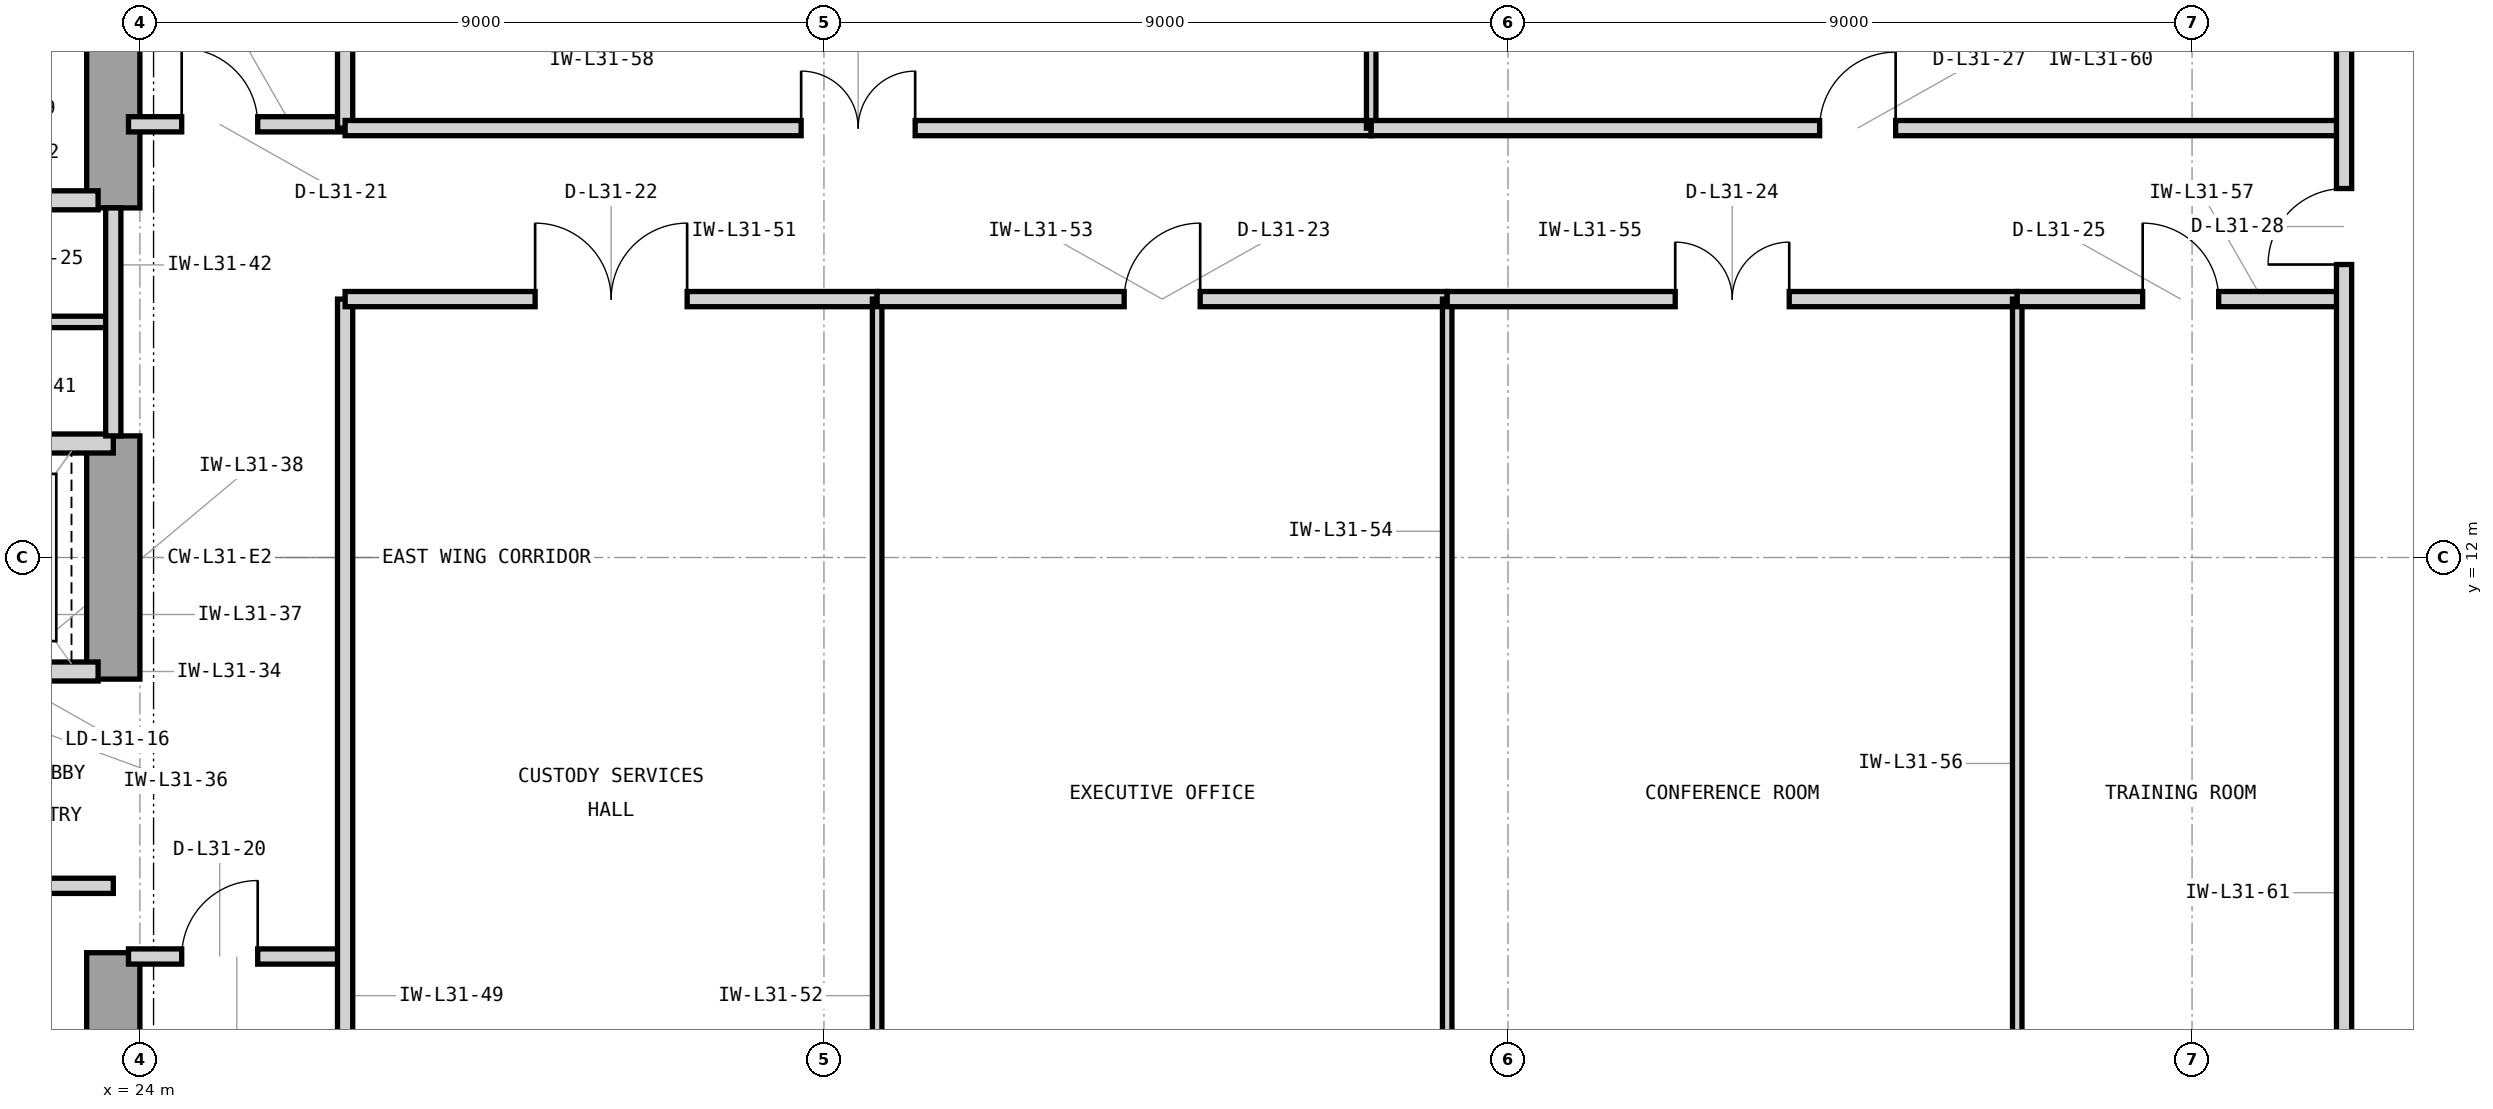
"""IFC4 building model, lengths in metres.
Left out: names, types, materials, properties, quantities, classifications, styles, units other than length and angle.
Written with IfcOpenShell. Run it as: python <this file> out.ifc"""

import sys

from ifc_helpers import new_model, si_unit, direction, frame, frame_2d, origin, place, context, subcontext, project, spatial, rectangle, extrude, element, fill, save


model = new_model("IFC4")
c1 = context("Model", 3, precision=1e-05, world=origin(), true_north=direction((0.0, 1.0)))
c2 = subcontext(c1, "Body", "Model", "MODEL_VIEW")
j1 = project(units=[si_unit("LENGTHUNIT", "METRE"), si_unit("PLANEANGLEUNIT", "RADIAN")], contexts=[c1])
p1 = place(None, origin())
s1 = spatial("IfcSite", under=j1, at=p1, CompositionType="ELEMENT")
p2 = place(p1, origin())
s2 = spatial("IfcBuilding", under=s1, at=p2, CompositionType="ELEMENT")
p3 = place(p2, frame((0.0, 0.0, 132.3)))
s3 = spatial("IfcBuildingStorey", under=s2, at=p3, CompositionType="ELEMENT", Elevation=132.3)
p4 = place(p3, frame((23.65, 3.7, 0.0), z_axis=(0.0, 0.0, 1.0), x_axis=(0.0, 1.0, 0.0)))
e1 = element("IfcWall", 1, at=p4, inside=s3, PredefinedType="SHEAR", context=c2, shape_type="SweptSolid", body=[
    extrude(rectangle(XDim=3.1, YDim=0.7, at=frame_2d((1.55, 0.0))), origin(), (0.0, 0.0, 1.0), 3.9),
])
p5 = place(p3, frame((23.65, 10.4, 0.0), z_axis=(0.0, 0.0, 1.0), x_axis=(0.0, 1.0, 0.0)))
e2 = element("IfcWall", 2, at=p5, inside=s3, PredefinedType="SHEAR", context=c2, shape_type="SweptSolid", body=[
    extrude(rectangle(XDim=3.2, YDim=0.7, at=frame_2d((1.6, 0.0))), origin(), (0.0, 0.0, 1.0), 3.9),
])
p6 = place(p3, frame((23.65, 16.6, 0.0), z_axis=(0.0, 0.0, 1.0), x_axis=(0.0, 1.0, 0.0)))
e3 = element("IfcWall", 3, at=p6, inside=s3, PredefinedType="SHEAR", context=c2, shape_type="SweptSolid", body=[
    extrude(rectangle(XDim=4.05, YDim=0.7, at=frame_2d((2.025, 0.0))), origin(), (0.0, 0.0, 1.0), 3.9),
])
p7 = place(p3, frame((21.05, 16.7, 0.0), z_axis=(0.0, 0.0, 1.0), x_axis=(1.0, 0.0, 0.0)))
e4 = element("IfcWall", 4, at=p7, inside=s3, PredefinedType="PARTITIONING", context=c2, shape_type="SweptSolid", body=[
    extrude(rectangle(XDim=2.4, YDim=0.25, at=frame_2d((1.2, 0.0))), origin(), (0.0, 0.0, 1.0), 3.233),
])
p8 = place(p3, frame((20.55, 7.68, 0.0), z_axis=(0.0, 0.0, 1.0), x_axis=(1.0, 0.0, 0.0)))
e5 = element("IfcWall", 5, at=p8, inside=s3, PredefinedType="PARTITIONING", context=c2, shape_type="SweptSolid", body=[
    extrude(rectangle(XDim=3.1, YDim=0.2, at=frame_2d((1.55, 0.0))), origin(), (0.0, 0.0, 1.0), 3.69),
])
p9 = place(p8, frame((1.075, 0.0, 0.0)))
e6 = element("IfcOpeningElement", 6, at=p9, cuts=e5, PredefinedType="OPENING", context=c2, shape_type="SweptSolid", body=[
    extrude(rectangle(XDim=0.95, YDim=2.1, at=frame_2d((0.475, 1.05))), frame((0.0, 0.11, 0.0), z_axis=(0.0, -1.0, 0.0), x_axis=(1.0, 0.0, 0.0)), (0.0, 0.0, 1.0), 0.22),
])
p10 = place(p3, frame((21.05, 10.5, 0.0), z_axis=(0.0, 0.0, 1.0), x_axis=(1.0, 0.0, 0.0)))
e7 = element("IfcWall", 7, at=p10, inside=s3, PredefinedType="PARTITIONING", context=c2, shape_type="SweptSolid", body=[
    extrude(rectangle(XDim=2.4, YDim=0.25, at=frame_2d((1.2, 0.0))), origin(), (0.0, 0.0, 1.0), 3.233),
])
p11 = place(p10, frame((0.48, 0.0, 0.0)))
e8 = element("IfcOpeningElement", 8, at=p11, cuts=e7, PredefinedType="OPENING", context=c2, shape_type="SweptSolid", body=[
    extrude(rectangle(XDim=1.15, YDim=2.25, at=frame_2d((0.575, 1.125))), frame((0.0, 0.135, 0.0), z_axis=(0.0, -1.0, 0.0), x_axis=(1.0, 0.0, 0.0)), (0.0, 0.0, 1.0), 0.27),
])
p12 = place(p3, frame((14.7, 13.5, 0.0), z_axis=(0.0, 0.0, 1.0), x_axis=(1.0, 0.0, 0.0)))
e9 = element("IfcWall", 9, at=p12, inside=s3, PredefinedType="PARTITIONING", context=c2, shape_type="SweptSolid", body=[
    extrude(rectangle(XDim=8.95, YDim=0.25, at=frame_2d((4.475, 0.0))), origin(), (0.0, 0.0, 1.0), 3.233),
])
p13 = place(p3, frame((16.6, 15.1, 0.0), z_axis=(0.0, 0.0, 1.0), x_axis=(1.0, 0.0, 0.0)))
e10 = element("IfcWall", 10, at=p13, inside=s3, PredefinedType="PARTITIONING", context=c2, shape_type="SweptSolid", body=[
    extrude(rectangle(XDim=7.05, YDim=0.15, at=frame_2d((3.525, 0.0))), origin(), (0.0, 0.0, 1.0), 3.69),
])
p14 = place(p3, frame((23.65, 13.6, 0.0), z_axis=(0.0, 0.0, 1.0), x_axis=(0.0, 1.0, 0.0)))
e11 = element("IfcWall", 11, at=p14, inside=s3, PredefinedType="PARTITIONING", context=c2, shape_type="SweptSolid", body=[
    extrude(rectangle(XDim=3.0, YDim=0.2, at=frame_2d((1.5, 0.0))), origin(), (0.0, 0.0, 1.0), 3.69),
])
p15 = place(p3, frame((23.85, 6.75, 0.0), z_axis=(0.0, 0.0, 1.0), x_axis=(1.0, 0.0, 0.0)))
e12 = element("IfcWall", 12, at=p15, inside=s3, PredefinedType="PARTITIONING", context=c2, shape_type="SweptSolid", body=[
    extrude(rectangle(XDim=2.85, YDim=0.2, at=frame_2d((1.425, 0.0))), origin(), (0.0, 0.0, 1.0), 3.69),
])
p16 = place(p15, frame((0.7, 0.0, 0.0)))
e13 = element("IfcOpeningElement", 13, at=p16, cuts=e12, PredefinedType="OPENING", context=c2, shape_type="SweptSolid", body=[
    extrude(rectangle(XDim=1.0, YDim=2.15, at=frame_2d((0.5, 1.075))), frame((0.0, 0.11, 0.0), z_axis=(0.0, -1.0, 0.0), x_axis=(1.0, 0.0, 0.0)), (0.0, 0.0, 1.0), 0.22),
])
p17 = place(p3, frame((23.85, 17.7, 0.0), z_axis=(0.0, 0.0, 1.0), x_axis=(1.0, 0.0, 0.0)))
e14 = element("IfcWall", 14, at=p17, inside=s3, PredefinedType="PARTITIONING", context=c2, shape_type="SweptSolid", body=[
    extrude(rectangle(XDim=2.85, YDim=0.2, at=frame_2d((1.425, 0.0))), origin(), (0.0, 0.0, 1.0), 3.69),
])
p18 = place(p17, frame((0.7, 0.0, 0.0)))
e15 = element("IfcOpeningElement", 15, at=p18, cuts=e14, PredefinedType="OPENING", context=c2, shape_type="SweptSolid", body=[
    extrude(rectangle(XDim=1.0, YDim=2.15, at=frame_2d((0.5, 1.075))), frame((0.0, 0.11, 0.0), z_axis=(0.0, -1.0, 0.0), x_axis=(1.0, 0.0, 0.0)), (0.0, 0.0, 1.0), 0.22),
])
p19 = place(p3, frame((26.7, 3.18, 0.0), z_axis=(0.0, 0.0, 1.0), x_axis=(0.0, 1.0, 0.0)))
e16 = element("IfcWall", 16, at=p19, inside=s3, PredefinedType="PARTITIONING", context=c2, shape_type="SweptSolid", body=[
    extrude(rectangle(XDim=12.22, YDim=0.2, at=frame_2d((6.11, 0.0))), origin(), (0.0, 0.0, 1.0), 3.69),
])
p20 = place(p3, frame((26.7, 17.65, 0.0), z_axis=(0.0, 0.0, 1.0), x_axis=(0.0, 1.0, 0.0)))
e17 = element("IfcWall", 17, at=p20, inside=s3, PredefinedType="PARTITIONING", context=c2, shape_type="SweptSolid", body=[
    extrude(rectangle(XDim=3.17, YDim=0.2, at=frame_2d((1.585, 0.0))), origin(), (0.0, 0.0, 1.0), 3.69),
])
p21 = place(p3, frame((26.7, 15.4, 0.0), z_axis=(0.0, 0.0, 1.0), x_axis=(1.0, 0.0, 0.0)))
e18 = element("IfcWall", 18, at=p21, inside=s3, PredefinedType="PARTITIONING", context=c2, shape_type="SweptSolid", body=[
    extrude(rectangle(XDim=7.0, YDim=0.2, at=frame_2d((3.5, 0.0))), origin(), (0.0, 0.0, 1.0), 3.69),
])
p22 = place(p21, frame((2.5, 0.0, 0.0)))
e19 = element("IfcOpeningElement", 19, at=p22, cuts=e18, PredefinedType="OPENING", context=c2, shape_type="SweptSolid", body=[
    extrude(rectangle(XDim=2.0, YDim=2.5, at=frame_2d((1.0, 1.25))), frame((0.0, 0.11, 0.0), z_axis=(0.0, -1.0, 0.0), x_axis=(1.0, 0.0, 0.0)), (0.0, 0.0, 1.0), 0.22),
])
p23 = place(p3, frame((33.7, 3.18, 0.0), z_axis=(0.0, 0.0, 1.0), x_axis=(0.0, 1.0, 0.0)))
e20 = element("IfcWall", 20, at=p23, inside=s3, PredefinedType="PARTITIONING", context=c2, shape_type="SweptSolid", body=[
    extrude(rectangle(XDim=12.22, YDim=0.125, at=frame_2d((6.11, 0.0))), origin(), (0.0, 0.0, 1.0), 3.69),
])
p24 = place(p3, frame((33.7, 15.4, 0.0), z_axis=(0.0, 0.0, 1.0), x_axis=(1.0, 0.0, 0.0)))
e21 = element("IfcWall", 21, at=p24, inside=s3, PredefinedType="PARTITIONING", context=c2, shape_type="SweptSolid", body=[
    extrude(rectangle(XDim=7.5, YDim=0.2, at=frame_2d((3.75, 0.0))), origin(), (0.0, 0.0, 1.0), 3.69),
])
p25 = place(p24, frame((3.25, 0.0, 0.0)))
e22 = element("IfcOpeningElement", 22, at=p25, cuts=e21, PredefinedType="OPENING", context=c2, shape_type="SweptSolid", body=[
    extrude(rectangle(XDim=1.0, YDim=2.15, at=frame_2d((0.5, 1.075))), frame((0.0, 0.11, 0.0), z_axis=(0.0, -1.0, 0.0), x_axis=(1.0, 0.0, 0.0)), (0.0, 0.0, 1.0), 0.22),
])
p26 = place(p3, frame((41.2, 3.18, 0.0), z_axis=(0.0, 0.0, 1.0), x_axis=(0.0, 1.0, 0.0)))
e23 = element("IfcWall", 23, at=p26, inside=s3, PredefinedType="PARTITIONING", context=c2, shape_type="SweptSolid", body=[
    extrude(rectangle(XDim=12.22, YDim=0.125, at=frame_2d((6.11, 0.0))), origin(), (0.0, 0.0, 1.0), 3.69),
])
p27 = place(p3, frame((41.2, 15.4, 0.0), z_axis=(0.0, 0.0, 1.0), x_axis=(1.0, 0.0, 0.0)))
e24 = element("IfcWall", 24, at=p27, inside=s3, PredefinedType="PARTITIONING", context=c2, shape_type="SweptSolid", body=[
    extrude(rectangle(XDim=7.5, YDim=0.2, at=frame_2d((3.75, 0.0))), origin(), (0.0, 0.0, 1.0), 3.69),
])
p28 = place(p27, frame((3.0, 0.0, 0.0)))
e25 = element("IfcOpeningElement", 25, at=p28, cuts=e24, PredefinedType="OPENING", context=c2, shape_type="SweptSolid", body=[
    extrude(rectangle(XDim=1.5, YDim=2.3, at=frame_2d((0.75, 1.15))), frame((0.0, 0.11, 0.0), z_axis=(0.0, -1.0, 0.0), x_axis=(1.0, 0.0, 0.0)), (0.0, 0.0, 1.0), 0.22),
])
p29 = place(p3, frame((48.7, 3.18, 0.0), z_axis=(0.0, 0.0, 1.0), x_axis=(0.0, 1.0, 0.0)))
e26 = element("IfcWall", 26, at=p29, inside=s3, PredefinedType="PARTITIONING", context=c2, shape_type="SweptSolid", body=[
    extrude(rectangle(XDim=12.22, YDim=0.125, at=frame_2d((6.11, 0.0))), origin(), (0.0, 0.0, 1.0), 3.69),
])
p30 = place(p3, frame((48.7, 15.4, 0.0), z_axis=(0.0, 0.0, 1.0), x_axis=(1.0, 0.0, 0.0)))
e27 = element("IfcWall", 27, at=p30, inside=s3, PredefinedType="PARTITIONING", context=c2, shape_type="SweptSolid", body=[
    extrude(rectangle(XDim=4.3, YDim=0.2, at=frame_2d((2.15, 0.0))), origin(), (0.0, 0.0, 1.0), 3.69),
])
p31 = place(p30, frame((1.65, 0.0, 0.0)))
e28 = element("IfcOpeningElement", 28, at=p31, cuts=e27, PredefinedType="OPENING", context=c2, shape_type="SweptSolid", body=[
    extrude(rectangle(XDim=1.0, YDim=2.15, at=frame_2d((0.5, 1.075))), frame((0.0, 0.11, 0.0), z_axis=(0.0, -1.0, 0.0), x_axis=(1.0, 0.0, 0.0)), (0.0, 0.0, 1.0), 0.22),
])
p32 = place(p3, frame((26.7, 17.65, 0.0), z_axis=(0.0, 0.0, 1.0), x_axis=(1.0, 0.0, 0.0)))
e29 = element("IfcWall", 29, at=p32, inside=s3, PredefinedType="PARTITIONING", context=c2, shape_type="SweptSolid", body=[
    extrude(rectangle(XDim=13.5, YDim=0.2, at=frame_2d((6.75, 0.0))), origin(), (0.0, 0.0, 1.0), 3.69),
])
p33 = place(p32, frame((6.0, 0.0, 0.0)))
e30 = element("IfcOpeningElement", 30, at=p33, cuts=e29, PredefinedType="OPENING", context=c2, shape_type="SweptSolid", body=[
    extrude(rectangle(XDim=1.5, YDim=2.3, at=frame_2d((0.75, 1.15))), frame((0.0, 0.11, 0.0), z_axis=(0.0, -1.0, 0.0), x_axis=(1.0, 0.0, 0.0)), (0.0, 0.0, 1.0), 0.22),
])
p34 = place(p3, frame((40.2, 17.65, 0.0), z_axis=(0.0, 0.0, 1.0), x_axis=(0.0, 1.0, 0.0)))
e31 = element("IfcWall", 31, at=p34, inside=s3, PredefinedType="PARTITIONING", context=c2, shape_type="SweptSolid", body=[
    extrude(rectangle(XDim=3.17, YDim=0.125, at=frame_2d((1.585, 0.0))), origin(), (0.0, 0.0, 1.0), 3.69),
])
p35 = place(p3, frame((40.2, 17.65, 0.0), z_axis=(0.0, 0.0, 1.0), x_axis=(1.0, 0.0, 0.0)))
e32 = element("IfcWall", 32, at=p35, inside=s3, PredefinedType="PARTITIONING", context=c2, shape_type="SweptSolid", body=[
    extrude(rectangle(XDim=12.8, YDim=0.2, at=frame_2d((6.4, 0.0))), origin(), (0.0, 0.0, 1.0), 3.69),
])
p36 = place(p35, frame((5.9, 0.0, 0.0)))
e33 = element("IfcOpeningElement", 33, at=p36, cuts=e32, PredefinedType="OPENING", context=c2, shape_type="SweptSolid", body=[
    extrude(rectangle(XDim=1.0, YDim=2.15, at=frame_2d((0.5, 1.075))), frame((0.0, 0.11, 0.0), z_axis=(0.0, -1.0, 0.0), x_axis=(1.0, 0.0, 0.0)), (0.0, 0.0, 1.0), 0.22),
])
p37 = place(p3, frame((53.0, 3.18, 0.0), z_axis=(0.0, 0.0, 1.0), x_axis=(0.0, 1.0, 0.0)))
e34 = element("IfcWall", 34, at=p37, inside=s3, PredefinedType="PARTITIONING", context=c2, shape_type="SweptSolid", body=[
    extrude(rectangle(XDim=17.64, YDim=0.2, at=frame_2d((8.82, 0.0))), origin(), (0.0, 0.0, 1.0), 3.69),
])
p38 = place(p37, frame((12.675, 0.0, 0.0)))
e35 = element("IfcOpeningElement", 35, at=p38, cuts=e34, PredefinedType="OPENING", context=c2, shape_type="SweptSolid", body=[
    extrude(rectangle(XDim=1.0, YDim=2.15, at=frame_2d((0.5, 1.075))), frame((0.0, 0.11, 0.0), z_axis=(0.0, -1.0, 0.0), x_axis=(1.0, 0.0, 0.0)), (0.0, 0.0, 1.0), 0.22),
])
p39 = place(p16, origin())
e36 = element("IfcDoor", 36, at=p39, inside=s3, OperationType="SINGLE_SWING_RIGHT", PredefinedType="DOOR", context=c2, shape_type="SweptSolid", body=[
    extrude(rectangle(XDim=1.0, YDim=2.15, at=frame_2d((0.5, 1.075))), frame((0.0, 0.025, 0.0), z_axis=(0.0, -1.0, 0.0), x_axis=(1.0, 0.0, 0.0)), (0.0, 0.0, 1.0), 0.05),
])
fill(e13, e36)
p40 = place(p18, origin())
e37 = element("IfcDoor", 37, at=p40, inside=s3, OperationType="SINGLE_SWING_LEFT", PredefinedType="DOOR", context=c2, shape_type="SweptSolid", body=[
    extrude(rectangle(XDim=1.0, YDim=2.15, at=frame_2d((0.5, 1.075))), frame((0.0, 0.025, 0.0), z_axis=(0.0, -1.0, 0.0), x_axis=(1.0, 0.0, 0.0)), (0.0, 0.0, 1.0), 0.05),
])
fill(e15, e37)
p41 = place(p22, origin())
e38 = element("IfcDoor", 38, at=p41, inside=s3, OperationType="DOUBLE_DOOR_SINGLE_SWING", PredefinedType="DOOR", context=c2, shape_type="SweptSolid", body=[
    extrude(rectangle(XDim=2.0, YDim=2.5, at=frame_2d((1.0, 1.25))), frame((0.0, 0.025, 0.0), z_axis=(0.0, -1.0, 0.0), x_axis=(1.0, 0.0, 0.0)), (0.0, 0.0, 1.0), 0.05),
])
fill(e19, e38)
p42 = place(p25, origin())
e39 = element("IfcDoor", 39, at=p42, inside=s3, OperationType="SINGLE_SWING_RIGHT", PredefinedType="DOOR", context=c2, shape_type="SweptSolid", body=[
    extrude(rectangle(XDim=1.0, YDim=2.15, at=frame_2d((0.5, 1.075))), frame((0.0, 0.025, 0.0), z_axis=(0.0, -1.0, 0.0), x_axis=(1.0, 0.0, 0.0)), (0.0, 0.0, 1.0), 0.05),
])
fill(e22, e39)
p43 = place(p28, origin())
e40 = element("IfcDoor", 40, at=p43, inside=s3, OperationType="DOUBLE_DOOR_SINGLE_SWING", PredefinedType="DOOR", context=c2, shape_type="SweptSolid", body=[
    extrude(rectangle(XDim=1.5, YDim=2.3, at=frame_2d((0.75, 1.15))), frame((0.0, 0.025, 0.0), z_axis=(0.0, -1.0, 0.0), x_axis=(1.0, 0.0, 0.0)), (0.0, 0.0, 1.0), 0.05),
])
fill(e25, e40)
p44 = place(p31, origin())
e41 = element("IfcDoor", 41, at=p44, inside=s3, OperationType="SINGLE_SWING_LEFT", PredefinedType="DOOR", context=c2, shape_type="SweptSolid", body=[
    extrude(rectangle(XDim=1.0, YDim=2.15, at=frame_2d((0.5, 1.075))), frame((0.0, 0.025, 0.0), z_axis=(0.0, -1.0, 0.0), x_axis=(1.0, 0.0, 0.0)), (0.0, 0.0, 1.0), 0.05),
])
fill(e28, e41)
p45 = place(p33, origin())
e42 = element("IfcDoor", 42, at=p45, inside=s3, OperationType="DOUBLE_DOOR_SINGLE_SWING", PredefinedType="DOOR", context=c2, shape_type="SweptSolid", body=[
    extrude(rectangle(XDim=1.5, YDim=2.3, at=frame_2d((0.75, 1.15))), frame((0.0, 0.025, 0.0), z_axis=(0.0, -1.0, 0.0), x_axis=(1.0, 0.0, 0.0)), (0.0, 0.0, 1.0), 0.05),
])
fill(e30, e42)
p46 = place(p36, origin())
e43 = element("IfcDoor", 43, at=p46, inside=s3, OperationType="SINGLE_SWING_RIGHT", PredefinedType="DOOR", context=c2, shape_type="SweptSolid", body=[
    extrude(rectangle(XDim=1.0, YDim=2.15, at=frame_2d((0.5, 1.075))), frame((0.0, 0.025, 0.0), z_axis=(0.0, -1.0, 0.0), x_axis=(1.0, 0.0, 0.0)), (0.0, 0.0, 1.0), 0.05),
])
fill(e33, e43)
p47 = place(p38, origin())
e44 = element("IfcDoor", 44, at=p47, inside=s3, OperationType="SINGLE_SWING_LEFT", PredefinedType="DOOR", context=c2, shape_type="SweptSolid", body=[
    extrude(rectangle(XDim=1.0, YDim=2.15, at=frame_2d((0.5, 1.075))), frame((0.0, 0.025, 0.0), z_axis=(0.0, -1.0, 0.0), x_axis=(1.0, 0.0, 0.0)), (0.0, 0.0, 1.0), 0.05),
])
fill(e35, e44)
save(model, sys.argv[1])
